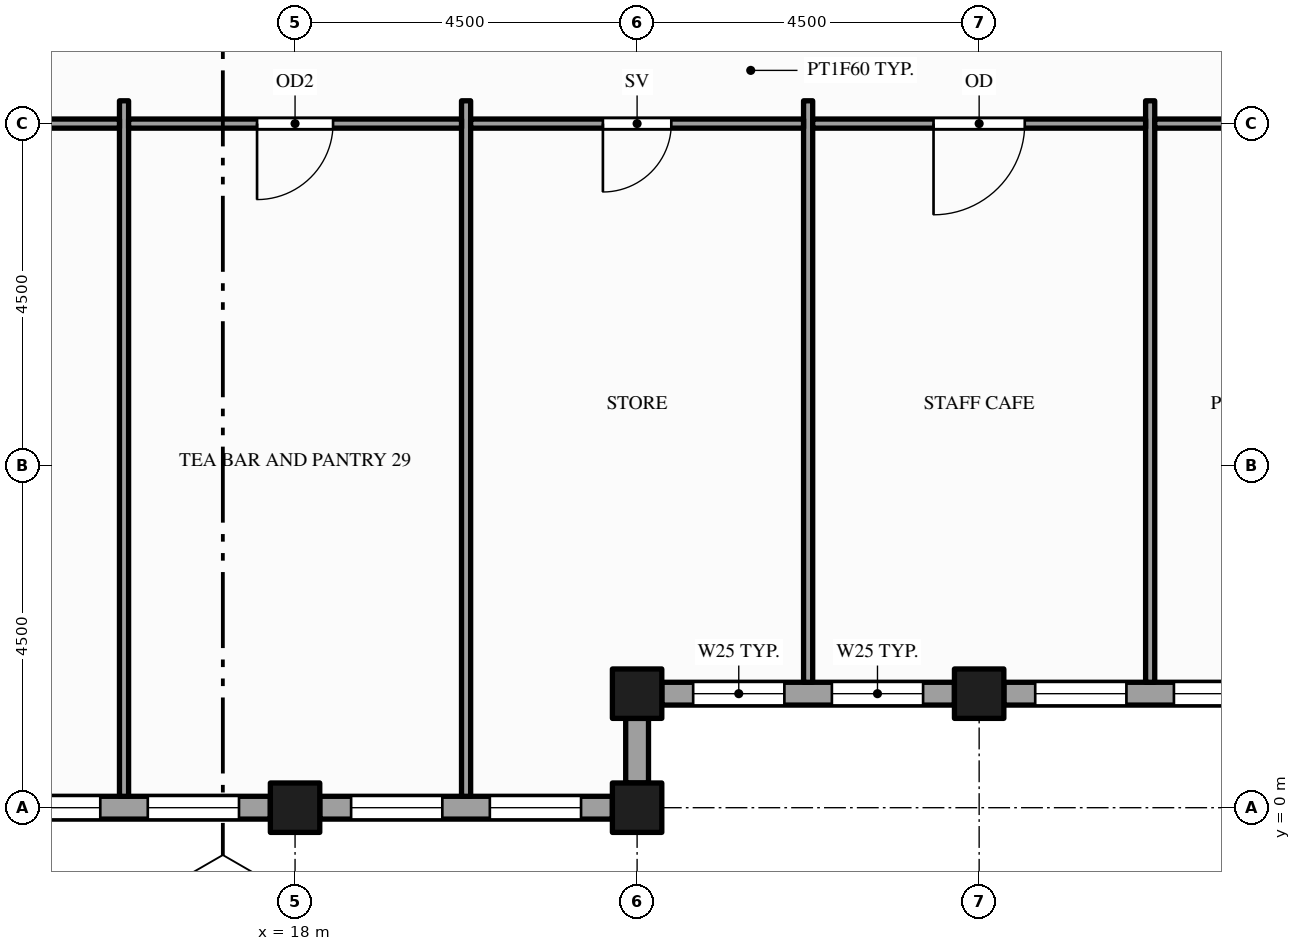
"""IFC4 building model, lengths in metres.
Left out: names, types, materials, properties, quantities, classifications, styles, units other than length and angle.
Written with IfcOpenShell. Run it as: python <this file> out.ifc"""

import sys

from ifc_helpers import new_model, si_unit, direction, frame, frame_2d, origin, origin_2d, place, context, subcontext, project, spatial, rectangle, hollow_rectangle, extrude, element, fill, save


model = new_model("IFC4")
c1 = context("Model", 3, precision=1e-05, world=origin(), true_north=direction((0.0, 1.0)))
c2 = subcontext(c1, "Body", "Model", "MODEL_VIEW")
j1 = project(units=[si_unit("LENGTHUNIT", "METRE"), si_unit("PLANEANGLEUNIT", "RADIAN")], contexts=[c1])
p1 = place(None, origin())
s1 = spatial("IfcSite", under=j1, at=p1, CompositionType="ELEMENT")
p2 = place(p1, origin())
s2 = spatial("IfcBuilding", under=s1, at=p2, CompositionType="ELEMENT")
p3 = place(p2, frame((0.0, 0.0, 293.0)))
s3 = spatial("IfcBuildingStorey", under=s2, at=p3, CompositionType="ELEMENT", Elevation=293.0)
for number, where, z_axis, x_axis in (
    (1, (18.0, 0.0, -0.15), (0.0, 0.0, 1.0), (1.0, 0.0, 0.0)),
    (2, (22.5, 0.0, -0.15), (0.0, 0.0, 1.0), (1.0, 0.0, 0.0)),
    (3, (22.5, 1.5, -0.15), (0.0, 0.0, 1.0), (1.0, 0.0, 0.0)),
    (4, (27.0, 1.5, -0.15), (0.0, 0.0, 1.0), (1.0, 0.0, 0.0)),
):
    element("IfcColumn", number, at=place(p3, frame(where, z_axis=z_axis, x_axis=x_axis)), inside=s3, PredefinedType="COLUMN", context=c2, shape_type="SweptSolid", body=[
        extrude(hollow_rectangle(XDim=0.65, YDim=0.65, WallThickness=0.032, at=origin_2d()), origin(), (0.0, 0.0, 1.0), 3.9),
    ])
p4 = place(p3, frame((22.5, 0.325, 0.0), z_axis=(0.0, 0.0, 1.0), x_axis=(0.0, 1.0, 0.0)))
e5 = element("IfcWall", 5, at=p4, inside=s3, PredefinedType="STANDARD", context=c2, shape_type="SweptSolid", body=[
    extrude(rectangle(XDim=0.85, YDim=0.3, at=frame_2d((0.425, 0.0))), origin(), (0.0, 0.0, 1.0), 3.062),
])
p5 = place(p3, frame((22.825, 1.5, 0.0), z_axis=(0.0, 0.0, 1.0), x_axis=(1.0, 0.0, 0.0)))
e6 = element("IfcWall", 6, at=p5, inside=s3, PredefinedType="STANDARD", context=c2, shape_type="SweptSolid", body=[
    extrude(rectangle(XDim=3.85, YDim=0.3, at=frame_2d((1.925, 0.0))), origin(), (0.0, 0.0, 1.0), 2.77),
])
p6 = place(p5, frame((0.413, 0.0, 0.9)))
e7 = element("IfcOpeningElement", 7, at=p6, cuts=e6, PredefinedType="OPENING", context=c2, shape_type="SweptSolid", body=[
    extrude(rectangle(XDim=1.2, YDim=1.5, at=frame_2d((0.6, 0.75))), frame((0.0, 0.16, 0.0), z_axis=(0.0, -1.0, 0.0), x_axis=(1.0, 0.0, 0.0)), (0.0, 0.0, 1.0), 0.32),
])
p7 = place(p5, frame((2.238, 0.0, 0.9)))
e8 = element("IfcOpeningElement", 8, at=p7, cuts=e6, PredefinedType="OPENING", context=c2, shape_type="SweptSolid", body=[
    extrude(rectangle(XDim=1.2, YDim=1.5, at=frame_2d((0.6, 0.75))), frame((0.0, 0.16, 0.0), z_axis=(0.0, -1.0, 0.0), x_axis=(1.0, 0.0, 0.0)), (0.0, 0.0, 1.0), 0.32),
])
p8 = place(p3, frame((27.325, 1.5, 0.0), z_axis=(0.0, 0.0, 1.0), x_axis=(1.0, 0.0, 0.0)))
e9 = element("IfcWall", 9, at=p8, inside=s3, PredefinedType="STANDARD", context=c2, shape_type="SweptSolid", body=[
    extrude(rectangle(XDim=3.85, YDim=0.3, at=frame_2d((1.925, 0.0))), origin(), (0.0, 0.0, 1.0), 2.77),
])
p9 = place(p8, frame((0.413, 0.0, 0.9)))
e10 = element("IfcOpeningElement", 10, at=p9, cuts=e9, PredefinedType="OPENING", context=c2, shape_type="SweptSolid", body=[
    extrude(rectangle(XDim=1.2, YDim=1.5, at=frame_2d((0.6, 0.75))), frame((0.0, 0.16, 0.0), z_axis=(0.0, -1.0, 0.0), x_axis=(1.0, 0.0, 0.0)), (0.0, 0.0, 1.0), 0.32),
])
p10 = place(p8, frame((2.238, 0.0, 0.9)))
e11 = element("IfcOpeningElement", 11, at=p10, cuts=e9, PredefinedType="OPENING", context=c2, shape_type="SweptSolid", body=[
    extrude(rectangle(XDim=1.2, YDim=1.5, at=frame_2d((0.6, 0.75))), frame((0.0, 0.16, 0.0), z_axis=(0.0, -1.0, 0.0), x_axis=(1.0, 0.0, 0.0)), (0.0, 0.0, 1.0), 0.32),
])
p11 = place(p3, frame((13.825, 0.0, 0.0), z_axis=(0.0, 0.0, 1.0), x_axis=(1.0, 0.0, 0.0)))
e12 = element("IfcWall", 12, at=p11, inside=s3, PredefinedType="STANDARD", context=c2, shape_type="SweptSolid", body=[
    extrude(rectangle(XDim=3.85, YDim=0.3, at=frame_2d((1.925, 0.0))), origin(), (0.0, 0.0, 1.0), 3.062),
])
p12 = place(p11, frame((0.413, 0.0, 0.9)))
e13 = element("IfcOpeningElement", 13, at=p12, cuts=e12, PredefinedType="OPENING", context=c2, shape_type="SweptSolid", body=[
    extrude(rectangle(XDim=1.2, YDim=2.0, at=frame_2d((0.6, 1.0))), frame((0.0, 0.16, 0.0), z_axis=(0.0, -1.0, 0.0), x_axis=(1.0, 0.0, 0.0)), (0.0, 0.0, 1.0), 0.32),
])
p13 = place(p11, frame((2.238, 0.0, 0.9)))
e14 = element("IfcOpeningElement", 14, at=p13, cuts=e12, PredefinedType="OPENING", context=c2, shape_type="SweptSolid", body=[
    extrude(rectangle(XDim=1.2, YDim=2.0, at=frame_2d((0.6, 1.0))), frame((0.0, 0.16, 0.0), z_axis=(0.0, -1.0, 0.0), x_axis=(1.0, 0.0, 0.0)), (0.0, 0.0, 1.0), 0.32),
])
p14 = place(p3, frame((18.325, 0.0, 0.0), z_axis=(0.0, 0.0, 1.0), x_axis=(1.0, 0.0, 0.0)))
e15 = element("IfcWall", 15, at=p14, inside=s3, PredefinedType="STANDARD", context=c2, shape_type="SweptSolid", body=[
    extrude(rectangle(XDim=3.85, YDim=0.3, at=frame_2d((1.925, 0.0))), origin(), (0.0, 0.0, 1.0), 3.062),
])
p15 = place(p14, frame((0.413, 0.0, 0.9)))
e16 = element("IfcOpeningElement", 16, at=p15, cuts=e15, PredefinedType="OPENING", context=c2, shape_type="SweptSolid", body=[
    extrude(rectangle(XDim=1.2, YDim=2.0, at=frame_2d((0.6, 1.0))), frame((0.0, 0.16, 0.0), z_axis=(0.0, -1.0, 0.0), x_axis=(1.0, 0.0, 0.0)), (0.0, 0.0, 1.0), 0.32),
])
p16 = place(p14, frame((2.238, 0.0, 0.9)))
e17 = element("IfcOpeningElement", 17, at=p16, cuts=e15, PredefinedType="OPENING", context=c2, shape_type="SweptSolid", body=[
    extrude(rectangle(XDim=1.2, YDim=2.0, at=frame_2d((0.6, 1.0))), frame((0.0, 0.16, 0.0), z_axis=(0.0, -1.0, 0.0), x_axis=(1.0, 0.0, 0.0)), (0.0, 0.0, 1.0), 0.32),
])
for number, where, z_axis, x_axis in (
    (18, (15.75, 0.15, 0.0), (0.0, 0.0, 1.0), (0.0, 1.0, 0.0)),
    (19, (20.25, 0.15, 0.0), (0.0, 0.0, 1.0), (0.0, 1.0, 0.0)),
):
    element("IfcWall", number, at=place(p3, frame(where, z_axis=z_axis, x_axis=x_axis)), inside=s3, PredefinedType="PARTITIONING", context=c2, shape_type="SweptSolid", body=[
        extrude(rectangle(XDim=9.15, YDim=0.12, at=frame_2d((4.575, 0.0))), origin(), (0.0, 0.0, 1.0), 2.77),
    ])
for number, where, z_axis, x_axis in (
    (20, (24.75, 1.65, 0.0), (0.0, 0.0, 1.0), (0.0, 1.0, 0.0)),
    (21, (29.25, 1.65, 0.0), (0.0, 0.0, 1.0), (0.0, 1.0, 0.0)),
):
    element("IfcWall", number, at=place(p3, frame(where, z_axis=z_axis, x_axis=x_axis)), inside=s3, PredefinedType="PARTITIONING", context=c2, shape_type="SweptSolid", body=[
        extrude(rectangle(XDim=7.65, YDim=0.12, at=frame_2d((3.825, 0.0))), origin(), (0.0, 0.0, 1.0), 2.77),
    ])
p17 = place(p3, frame((11.31, 9.0, 0.0), z_axis=(0.0, 0.0, 1.0), x_axis=(1.0, 0.0, 0.0)))
e22 = element("IfcWall", 22, at=p17, inside=s3, PredefinedType="PARTITIONING", context=c2, shape_type="SweptSolid", body=[
    extrude(rectangle(XDim=4.38, YDim=0.12, at=frame_2d((2.19, 0.0))), origin(), (0.0, 0.0, 1.0), 2.77),
])
p18 = place(p17, frame((1.69, 0.0, 0.0)))
e23 = element("IfcOpeningElement", 23, at=p18, cuts=e22, PredefinedType="OPENING", context=c2, shape_type="SweptSolid", body=[
    extrude(rectangle(XDim=1.0, YDim=2.1, at=frame_2d((0.5, 1.05))), frame((0.0, 0.07, 0.0), z_axis=(0.0, -1.0, 0.0), x_axis=(1.0, 0.0, 0.0)), (0.0, 0.0, 1.0), 0.14),
])
p19 = place(p3, frame((15.81, 9.0, 0.0), z_axis=(0.0, 0.0, 1.0), x_axis=(1.0, 0.0, 0.0)))
e24 = element("IfcWall", 24, at=p19, inside=s3, PredefinedType="PARTITIONING", context=c2, shape_type="SweptSolid", body=[
    extrude(rectangle(XDim=4.38, YDim=0.12, at=frame_2d((2.19, 0.0))), origin(), (0.0, 0.0, 1.0), 2.77),
])
p20 = place(p19, frame((1.69, 0.0, 0.0)))
e25 = element("IfcOpeningElement", 25, at=p20, cuts=e24, PredefinedType="OPENING", context=c2, shape_type="SweptSolid", body=[
    extrude(rectangle(XDim=1.0, YDim=2.1, at=frame_2d((0.5, 1.05))), frame((0.0, 0.07, 0.0), z_axis=(0.0, -1.0, 0.0), x_axis=(1.0, 0.0, 0.0)), (0.0, 0.0, 1.0), 0.14),
])
p21 = place(p3, frame((20.31, 9.0, 0.0), z_axis=(0.0, 0.0, 1.0), x_axis=(1.0, 0.0, 0.0)))
e26 = element("IfcWall", 26, at=p21, inside=s3, PredefinedType="PARTITIONING", context=c2, shape_type="SweptSolid", body=[
    extrude(rectangle(XDim=4.38, YDim=0.12, at=frame_2d((2.19, 0.0))), origin(), (0.0, 0.0, 1.0), 2.77),
])
p22 = place(p21, frame((1.74, 0.0, 0.0)))
e27 = element("IfcOpeningElement", 27, at=p22, cuts=e26, PredefinedType="OPENING", context=c2, shape_type="SweptSolid", body=[
    extrude(rectangle(XDim=0.9, YDim=2.1, at=frame_2d((0.45, 1.05))), frame((0.0, 0.07, 0.0), z_axis=(0.0, -1.0, 0.0), x_axis=(1.0, 0.0, 0.0)), (0.0, 0.0, 1.0), 0.14),
])
p23 = place(p3, frame((24.81, 9.0, 0.0), z_axis=(0.0, 0.0, 1.0), x_axis=(1.0, 0.0, 0.0)))
e28 = element("IfcWall", 28, at=p23, inside=s3, PredefinedType="PARTITIONING", context=c2, shape_type="SweptSolid", body=[
    extrude(rectangle(XDim=4.38, YDim=0.12, at=frame_2d((2.19, 0.0))), origin(), (0.0, 0.0, 1.0), 2.77),
])
p24 = place(p23, frame((1.59, 0.0, 0.0)))
e29 = element("IfcOpeningElement", 29, at=p24, cuts=e28, PredefinedType="OPENING", context=c2, shape_type="SweptSolid", body=[
    extrude(rectangle(XDim=1.2, YDim=2.1, at=frame_2d((0.6, 1.05))), frame((0.0, 0.07, 0.0), z_axis=(0.0, -1.0, 0.0), x_axis=(1.0, 0.0, 0.0)), (0.0, 0.0, 1.0), 0.14),
])
p25 = place(p3, frame((29.31, 9.0, 0.0), z_axis=(0.0, 0.0, 1.0), x_axis=(1.0, 0.0, 0.0)))
e30 = element("IfcWall", 30, at=p25, inside=s3, PredefinedType="PARTITIONING", context=c2, shape_type="SweptSolid", body=[
    extrude(rectangle(XDim=4.38, YDim=0.12, at=frame_2d((2.19, 0.0))), origin(), (0.0, 0.0, 1.0), 2.77),
])
p26 = place(p25, frame((1.74, 0.0, 0.0)))
e31 = element("IfcOpeningElement", 31, at=p26, cuts=e30, PredefinedType="OPENING", context=c2, shape_type="SweptSolid", body=[
    extrude(rectangle(XDim=0.9, YDim=2.1, at=frame_2d((0.45, 1.05))), frame((0.0, 0.07, 0.0), z_axis=(0.0, -1.0, 0.0), x_axis=(1.0, 0.0, 0.0)), (0.0, 0.0, 1.0), 0.14),
])
p27 = place(p6, origin())
e32 = element("IfcWindow", 32, at=p27, inside=s3, PartitioningType="SINGLE_PANEL", PredefinedType="WINDOW", context=c2, shape_type="SweptSolid", body=[
    extrude(rectangle(XDim=1.2, YDim=1.5, at=frame_2d((0.6, 0.75))), frame((0.0, 0.03, 0.0), z_axis=(0.0, -1.0, 0.0), x_axis=(1.0, 0.0, 0.0)), (0.0, 0.0, 1.0), 0.06),
])
fill(e7, e32)
p28 = place(p7, origin())
e33 = element("IfcWindow", 33, at=p28, inside=s3, PartitioningType="SINGLE_PANEL", PredefinedType="WINDOW", context=c2, shape_type="SweptSolid", body=[
    extrude(rectangle(XDim=1.2, YDim=1.5, at=frame_2d((0.6, 0.75))), frame((0.0, 0.03, 0.0), z_axis=(0.0, -1.0, 0.0), x_axis=(1.0, 0.0, 0.0)), (0.0, 0.0, 1.0), 0.06),
])
fill(e8, e33)
p29 = place(p9, origin())
e34 = element("IfcWindow", 34, at=p29, inside=s3, PartitioningType="SINGLE_PANEL", PredefinedType="WINDOW", context=c2, shape_type="SweptSolid", body=[
    extrude(rectangle(XDim=1.2, YDim=1.5, at=frame_2d((0.6, 0.75))), frame((0.0, 0.03, 0.0), z_axis=(0.0, -1.0, 0.0), x_axis=(1.0, 0.0, 0.0)), (0.0, 0.0, 1.0), 0.06),
])
fill(e10, e34)
p30 = place(p10, origin())
e35 = element("IfcWindow", 35, at=p30, inside=s3, PartitioningType="SINGLE_PANEL", PredefinedType="WINDOW", context=c2, shape_type="SweptSolid", body=[
    extrude(rectangle(XDim=1.2, YDim=1.5, at=frame_2d((0.6, 0.75))), frame((0.0, 0.03, 0.0), z_axis=(0.0, -1.0, 0.0), x_axis=(1.0, 0.0, 0.0)), (0.0, 0.0, 1.0), 0.06),
])
fill(e11, e35)
p31 = place(p12, origin())
e36 = element("IfcWindow", 36, at=p31, inside=s3, PartitioningType="SINGLE_PANEL", PredefinedType="WINDOW", context=c2, shape_type="SweptSolid", body=[
    extrude(rectangle(XDim=1.2, YDim=2.0, at=frame_2d((0.6, 1.0))), frame((0.0, 0.03, 0.0), z_axis=(0.0, -1.0, 0.0), x_axis=(1.0, 0.0, 0.0)), (0.0, 0.0, 1.0), 0.06),
])
fill(e13, e36)
p32 = place(p13, origin())
e37 = element("IfcWindow", 37, at=p32, inside=s3, PartitioningType="SINGLE_PANEL", PredefinedType="WINDOW", context=c2, shape_type="SweptSolid", body=[
    extrude(rectangle(XDim=1.2, YDim=2.0, at=frame_2d((0.6, 1.0))), frame((0.0, 0.03, 0.0), z_axis=(0.0, -1.0, 0.0), x_axis=(1.0, 0.0, 0.0)), (0.0, 0.0, 1.0), 0.06),
])
fill(e14, e37)
p33 = place(p15, origin())
e38 = element("IfcWindow", 38, at=p33, inside=s3, PartitioningType="SINGLE_PANEL", PredefinedType="WINDOW", context=c2, shape_type="SweptSolid", body=[
    extrude(rectangle(XDim=1.2, YDim=2.0, at=frame_2d((0.6, 1.0))), frame((0.0, 0.03, 0.0), z_axis=(0.0, -1.0, 0.0), x_axis=(1.0, 0.0, 0.0)), (0.0, 0.0, 1.0), 0.06),
])
fill(e16, e38)
p34 = place(p16, origin())
e39 = element("IfcWindow", 39, at=p34, inside=s3, PartitioningType="SINGLE_PANEL", PredefinedType="WINDOW", context=c2, shape_type="SweptSolid", body=[
    extrude(rectangle(XDim=1.2, YDim=2.0, at=frame_2d((0.6, 1.0))), frame((0.0, 0.03, 0.0), z_axis=(0.0, -1.0, 0.0), x_axis=(1.0, 0.0, 0.0)), (0.0, 0.0, 1.0), 0.06),
])
fill(e17, e39)
p35 = place(p20, origin())
e40 = element("IfcDoor", 40, at=p35, inside=s3, OperationType="SINGLE_SWING_LEFT", PredefinedType="DOOR", context=c2, shape_type="SweptSolid", body=[
    extrude(rectangle(XDim=1.0, YDim=2.1, at=frame_2d((0.5, 1.05))), frame((0.0, 0.025, 0.0), z_axis=(0.0, -1.0, 0.0), x_axis=(1.0, 0.0, 0.0)), (0.0, 0.0, 1.0), 0.05),
])
fill(e25, e40)
p36 = place(p22, origin())
e41 = element("IfcDoor", 41, at=p36, inside=s3, OperationType="SINGLE_SWING_LEFT", PredefinedType="DOOR", context=c2, shape_type="SweptSolid", body=[
    extrude(rectangle(XDim=0.9, YDim=2.1, at=frame_2d((0.45, 1.05))), frame((0.0, 0.025, 0.0), z_axis=(0.0, -1.0, 0.0), x_axis=(1.0, 0.0, 0.0)), (0.0, 0.0, 1.0), 0.05),
])
fill(e27, e41)
p37 = place(p24, origin())
e42 = element("IfcDoor", 42, at=p37, inside=s3, OperationType="SINGLE_SWING_LEFT", PredefinedType="DOOR", context=c2, shape_type="SweptSolid", body=[
    extrude(rectangle(XDim=1.2, YDim=2.1, at=frame_2d((0.6, 1.05))), frame((0.0, 0.025, 0.0), z_axis=(0.0, -1.0, 0.0), x_axis=(1.0, 0.0, 0.0)), (0.0, 0.0, 1.0), 0.05),
])
fill(e29, e42)
save(model, sys.argv[1])
